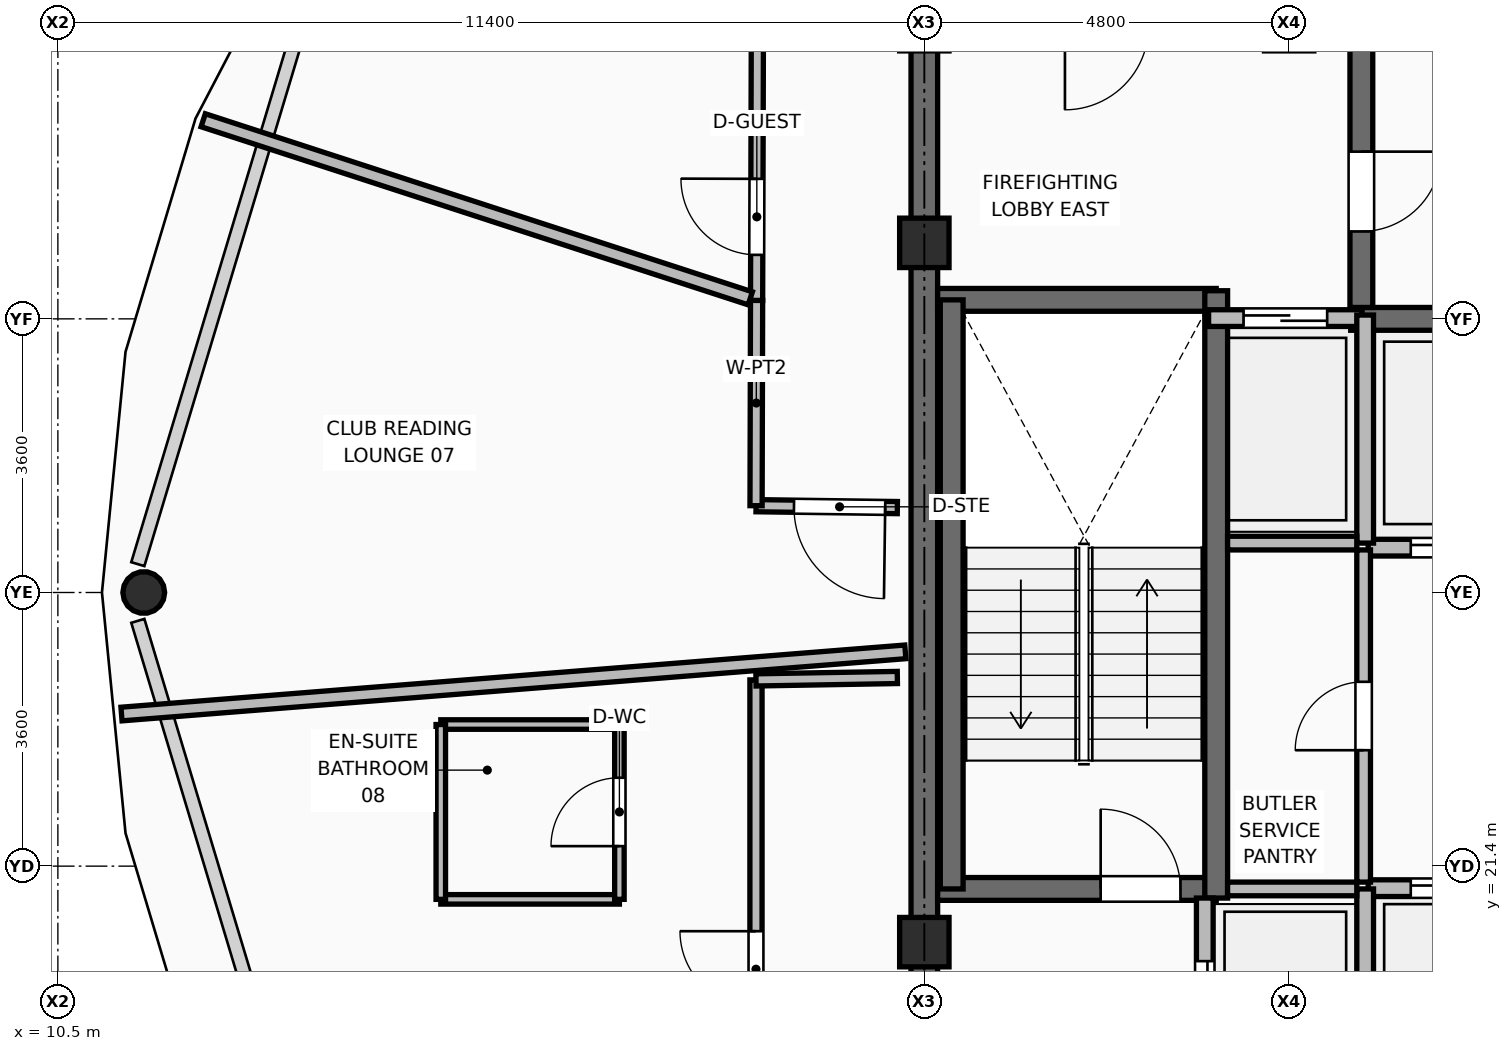
"""IFC4 building model, lengths in metres.
Left out: names, types, materials, properties, quantities, classifications, styles, units other than length and angle.
Written with IfcOpenShell. Run it as: python <this file> out.ifc"""

import sys

from ifc_helpers import new_model, si_unit, direction, frame, frame_2d, origin, origin_2d, place, context, subcontext, project, spatial, rectangle, hollow_circle, extrude, element, fill, save


model = new_model("IFC4")
c1 = context("Model", 3, precision=1e-05, world=origin(), true_north=direction((0.0, 1.0)))
c2 = subcontext(c1, "Body", "Model", "MODEL_VIEW")
j1 = project(units=[si_unit("LENGTHUNIT", "METRE"), si_unit("PLANEANGLEUNIT", "RADIAN")], contexts=[c1])
p1 = place(None, origin())
s1 = spatial("IfcSite", under=j1, at=p1, CompositionType="ELEMENT")
p2 = place(p1, origin())
s2 = spatial("IfcBuilding", under=s1, at=p2, CompositionType="ELEMENT")
p3 = place(p2, frame((0.0, 0.0, 263.85)))
s3 = spatial("IfcBuildingStorey", under=s2, at=p3, CompositionType="ELEMENT", Elevation=263.85)
for number, where, z_axis, x_axis in (
    (1, (21.9, 20.4, 0.0), (0.0, 0.0, 1.0), (1.0, 0.0, 0.0)),
    (2, (21.9, 29.6, 0.0), (0.0, 0.0, 1.0), (1.0, 0.0, 0.0)),
):
    element("IfcColumn", number, at=place(p3, frame(where, z_axis=z_axis, x_axis=x_axis)), inside=s3, PredefinedType="COLUMN", context=c2, shape_type="SweptSolid", body=[
        extrude(rectangle(XDim=0.65, YDim=0.65, at=origin_2d()), origin(), (0.0, 0.0, 1.0), 3.75),
    ])
p4 = place(p3, frame((11.63, 25.0, 0.0), z_axis=(0.022426310188, 0.0, 0.999748498679), x_axis=(0.0, 1.0, 0.0)))
e3 = element("IfcColumn", 3, at=p4, inside=s3, PredefinedType="COLUMN", context=c2, shape_type="SweptSolid", body=[
    extrude(hollow_circle(Radius=0.275, WallThickness=0.025, at=origin_2d()), origin(), (0.0, 0.0, 1.0), 3.571),
])
p5 = place(p3, frame((21.9, 17.975, 0.0), z_axis=(0.0, 0.0, 1.0), x_axis=(0.0, 1.0, 0.0)))
e4 = element("IfcWall", 4, at=p5, inside=s3, PredefinedType="SHEAR", context=c2, shape_type="SweptSolid", body=[
    extrude(rectangle(XDim=14.3, YDim=0.35, at=frame_2d((7.15, 0.0))), origin(), (0.0, 0.0, 1.0), 3.57),
])
p6 = place(p3, frame((22.075, 21.1, 0.0), z_axis=(0.0, 0.0, 1.0), x_axis=(1.0, 0.0, 0.0)))
e5 = element("IfcWall", 5, at=p6, inside=s3, PredefinedType="SHEAR", context=c2, shape_type="SweptSolid", body=[
    extrude(rectangle(XDim=3.665, YDim=0.3, at=frame_2d((1.833, 0.0))), origin(), (0.0, 0.0, 1.0), 3.57),
])
p7 = place(p6, frame((2.145, 0.0, 0.0)))
e6 = element("IfcOpeningElement", 6, at=p7, cuts=e5, PredefinedType="OPENING", context=c2, shape_type="SweptSolid", body=[
    extrude(rectangle(XDim=1.05, YDim=2.1, at=frame_2d((0.525, 1.05))), frame((0.0, 0.16, 0.0), z_axis=(0.0, -1.0, 0.0), x_axis=(1.0, 0.0, 0.0)), (0.0, 0.0, 1.0), 0.32),
])
p8 = place(p3, frame((22.075, 28.85, 0.0), z_axis=(0.0, 0.0, 1.0), x_axis=(1.0, 0.0, 0.0)))
e7 = element("IfcWall", 7, at=p8, inside=s3, PredefinedType="SHEAR", context=c2, shape_type="SweptSolid", body=[
    extrude(rectangle(XDim=3.665, YDim=0.3, at=frame_2d((1.833, 0.0))), origin(), (0.0, 0.0, 1.0), 3.57),
])
p9 = place(p3, frame((25.74, 20.98, 0.0), z_axis=(0.0, 0.0, 1.0), x_axis=(0.0, 1.0, 0.0)))
e8 = element("IfcWall", 8, at=p9, inside=s3, PredefinedType="SHEAR", context=c2, shape_type="SweptSolid", body=[
    extrude(rectangle(XDim=7.99, YDim=0.3, at=frame_2d((3.995, 0.0))), origin(), (0.0, 0.0, 1.0), 3.57),
])
p10 = place(p3, frame((22.26, 21.1, 0.0), z_axis=(0.0, 0.0, 1.0), x_axis=(0.0, 1.0, 0.0)))
e9 = element("IfcWall", 9, at=p10, inside=s3, PredefinedType="SHEAR", context=c2, shape_type="SweptSolid", body=[
    extrude(rectangle(XDim=7.75, YDim=0.3, at=frame_2d((3.875, 0.0))), origin(), (0.0, 0.0, 1.0), 3.57),
])
p11 = place(p3, frame((27.51, 28.6, 0.0), z_axis=(0.0, 0.0, 1.0), x_axis=(1.0, 0.0, 0.0)))
e10 = element("IfcWall", 10, at=p11, inside=s3, PredefinedType="SHEAR", context=c2, shape_type="SweptSolid", body=[
    extrude(rectangle(XDim=8.03, YDim=0.3, at=frame_2d((4.015, 0.0))), origin(), (0.0, 0.0, 1.0), 3.57),
])
p12 = place(p3, frame((27.65, 28.75, 0.0), z_axis=(0.0, 0.0, 1.0), x_axis=(0.0, 1.0, 0.0)))
e11 = element("IfcWall", 11, at=p12, inside=s3, PredefinedType="SHEAR", context=c2, shape_type="SweptSolid", body=[
    extrude(rectangle(XDim=3.525, YDim=0.3, at=frame_2d((1.762, 0.0))), origin(), (0.0, 0.0, 1.0), 3.57),
])
p13 = place(p12, frame((1.0, 0.0, 0.0)))
e12 = element("IfcOpeningElement", 12, at=p13, cuts=e11, PredefinedType="OPENING", context=c2, shape_type="SweptSolid", body=[
    extrude(rectangle(XDim=1.05, YDim=2.1, at=frame_2d((0.525, 1.05))), frame((0.0, 0.16, 0.0), z_axis=(0.0, -1.0, 0.0), x_axis=(1.0, 0.0, 0.0)), (0.0, 0.0, 1.0), 0.32),
])
p14 = place(p3, frame((25.59, 18.22, 0.0), z_axis=(0.0, 0.0, 1.0), x_axis=(0.0, 1.0, 0.0)))
e13 = element("IfcWall", 13, at=p14, inside=s3, PredefinedType="PARTITIONING", context=c2, shape_type="SweptSolid", body=[
    extrude(rectangle(XDim=2.76, YDim=0.22, at=frame_2d((1.38, 0.0))), origin(), (0.0, 0.0, 1.0), 3.55),
])
p15 = place(p14, frame((0.83, 0.0, 0.0)))
e14 = element("IfcOpeningElement", 14, at=p15, cuts=e13, PredefinedType="OPENING", context=c2, shape_type="SweptSolid", body=[
    extrude(rectangle(XDim=1.1, YDim=2.2, at=frame_2d((0.55, 1.1))), frame((0.0, 0.12, 0.0), z_axis=(0.0, -1.0, 0.0), x_axis=(1.0, 0.0, 0.0)), (0.0, 0.0, 1.0), 0.24),
])
p16 = place(p3, frame((25.64, 28.61, 0.0), z_axis=(0.0, 0.0, 1.0), x_axis=(1.0, 0.0, 0.0)))
e15 = element("IfcWall", 15, at=p16, inside=s3, PredefinedType="PARTITIONING", context=c2, shape_type="SweptSolid", body=[
    extrude(rectangle(XDim=2.02, YDim=0.22, at=frame_2d((1.01, 0.0))), origin(), (0.0, 0.0, 1.0), 3.55),
])
p17 = place(p16, frame((0.46, 0.0, 0.0)))
e16 = element("IfcOpeningElement", 16, at=p17, cuts=e15, PredefinedType="OPENING", context=c2, shape_type="SweptSolid", body=[
    extrude(rectangle(XDim=1.1, YDim=2.2, at=frame_2d((0.55, 1.1))), frame((0.0, 0.12, 0.0), z_axis=(0.0, -1.0, 0.0), x_axis=(1.0, 0.0, 0.0)), (0.0, 0.0, 1.0), 0.24),
])
p18 = place(p3, frame((27.74, 21.11, 0.0), z_axis=(0.0, 0.0, 1.0), x_axis=(1.0, 0.0, 0.0)))
e17 = element("IfcWall", 17, at=p18, inside=s3, PredefinedType="PARTITIONING", context=c2, shape_type="SweptSolid", body=[
    extrude(rectangle(XDim=2.22, YDim=0.22, at=frame_2d((1.11, 0.0))), origin(), (0.0, 0.0, 1.0), 3.55),
])
p19 = place(p18, frame((0.56, 0.0, 0.0)))
e18 = element("IfcOpeningElement", 18, at=p19, cuts=e17, PredefinedType="OPENING", context=c2, shape_type="SweptSolid", body=[
    extrude(rectangle(XDim=1.1, YDim=2.2, at=frame_2d((0.55, 1.1))), frame((0.0, 0.12, 0.0), z_axis=(0.0, -1.0, 0.0), x_axis=(1.0, 0.0, 0.0)), (0.0, 0.0, 1.0), 0.24),
])
p20 = place(p3, frame((27.74, 25.59, 0.0), z_axis=(0.0, 0.0, 1.0), x_axis=(1.0, 0.0, 0.0)))
e19 = element("IfcWall", 19, at=p20, inside=s3, PredefinedType="PARTITIONING", context=c2, shape_type="SweptSolid", body=[
    extrude(rectangle(XDim=2.22, YDim=0.22, at=frame_2d((1.11, 0.0))), origin(), (0.0, 0.0, 1.0), 3.55),
])
p21 = place(p20, frame((0.56, 0.0, 0.0)))
e20 = element("IfcOpeningElement", 20, at=p21, cuts=e19, PredefinedType="OPENING", context=c2, shape_type="SweptSolid", body=[
    extrude(rectangle(XDim=1.1, YDim=2.2, at=frame_2d((0.55, 1.1))), frame((0.0, 0.12, 0.0), z_axis=(0.0, -1.0, 0.0), x_axis=(1.0, 0.0, 0.0)), (0.0, 0.0, 1.0), 0.24),
])
p22 = place(p3, frame((27.7, 18.15, 0.0), z_axis=(0.0, 0.0, 1.0), x_axis=(0.0, 1.0, 0.0)))
e21 = element("IfcWall", 21, at=p22, inside=s3, PredefinedType="PARTITIONING", context=c2, shape_type="SweptSolid", body=[
    extrude(rectangle(XDim=2.95, YDim=0.22, at=frame_2d((1.475, 0.0))), origin(), (0.0, 0.0, 1.0), 3.55),
])
p23 = place(p3, frame((27.7, 25.65, 0.0), z_axis=(0.0, 0.0, 1.0), x_axis=(0.0, 1.0, 0.0)))
e22 = element("IfcWall", 22, at=p23, inside=s3, PredefinedType="PARTITIONING", context=c2, shape_type="SweptSolid", body=[
    extrude(rectangle(XDim=3.0, YDim=0.22, at=frame_2d((1.5, 0.0))), origin(), (0.0, 0.0, 1.0), 3.55),
])
for number, where, z_axis, x_axis in (
    (23, (25.89, 21.1, 0.0), (0.0, 0.0, 1.0), (1.0, 0.0, 0.0)),
    (24, (25.89, 25.65, 0.0), (0.0, 0.0, 1.0), (1.0, 0.0, 0.0)),
):
    element("IfcWall", number, at=place(p3, frame(where, z_axis=z_axis, x_axis=x_axis)), inside=s3, PredefinedType="PARTITIONING", context=c2, shape_type="SweptSolid", body=[
        extrude(rectangle(XDim=1.7, YDim=0.18, at=frame_2d((0.85, 0.0))), origin(), (0.0, 0.0, 1.0), 3.55),
    ])
p24 = place(p3, frame((27.68, 21.19, 0.0), z_axis=(0.0, 0.0, 1.0), x_axis=(0.0, 1.0, 0.0)))
e25 = element("IfcWall", 25, at=p24, inside=s3, PredefinedType="PARTITIONING", context=c2, shape_type="SweptSolid", body=[
    extrude(rectangle(XDim=4.37, YDim=0.18, at=frame_2d((2.185, 0.0))), origin(), (0.0, 0.0, 1.0), 3.55),
])
p25 = place(p24, frame((1.735, 0.0, 0.0)))
e26 = element("IfcOpeningElement", 26, at=p25, cuts=e25, PredefinedType="OPENING", context=c2, shape_type="SweptSolid", body=[
    extrude(rectangle(XDim=0.9, YDim=2.1, at=frame_2d((0.45, 1.05))), frame((0.0, 0.1, 0.0), z_axis=(0.0, -1.0, 0.0), x_axis=(1.0, 0.0, 0.0)), (0.0, 0.0, 1.0), 0.2),
])
p26 = place(p3, frame((21.545, 26.117, 0.0), z_axis=(0.0, 0.0, 1.0), x_axis=(-0.999908513059, 0.0135264745, 0.0)))
e27 = element("IfcWall", 27, at=p26, inside=s3, PredefinedType="PARTITIONING", context=c2, shape_type="SweptSolid", body=[
    extrude(rectangle(XDim=1.859, YDim=0.16, at=frame_2d((0.93, 0.0))), origin(), (0.0, 0.0, 1.0), 2.595),
])
p27 = place(p26, frame((0.16, 0.0, 0.0)))
e28 = element("IfcOpeningElement", 28, at=p27, cuts=e27, PredefinedType="OPENING", context=c2, shape_type="SweptSolid", body=[
    extrude(rectangle(XDim=1.2, YDim=2.1, at=frame_2d((0.6, 1.05))), frame((0.0, 0.09, 0.0), z_axis=(0.0, -1.0, 0.0), x_axis=(1.0, 0.0, 0.0)), (0.0, 0.0, 1.0), 0.18),
])
p28 = place(p3, frame((19.686, 26.142, 0.0), z_axis=(0.0, 0.0, 1.0), x_axis=(0.002621341441, 0.999996564279, 0.0)))
e29 = element("IfcWall", 29, at=p28, inside=s3, PredefinedType="PARTITIONING", context=c2, shape_type="SweptSolid", body=[
    extrude(rectangle(XDim=2.701, YDim=0.16, at=frame_2d((1.351, 0.0))), origin(), (0.0, 0.0, 1.0), 3.55),
])
p29 = place(p3, frame((19.693, 28.843, 0.0), z_axis=(0.0, 0.0, 1.0), x_axis=(0.002904196475, 0.999995782813, 0.0)))
e30 = element("IfcWall", 30, at=p29, inside=s3, PredefinedType="PARTITIONING", context=c2, shape_type="SweptSolid", body=[
    extrude(rectangle(XDim=5.128, YDim=0.16, at=frame_2d((2.564, 0.0))), origin(), (0.0, 0.0, 1.0), 3.092),
])
p30 = place(p29, frame((0.599, 0.0, 0.0)))
e31 = element("IfcOpeningElement", 31, at=p30, cuts=e30, PredefinedType="OPENING", context=c2, shape_type="SweptSolid", body=[
    extrude(rectangle(XDim=1.0, YDim=2.1, at=frame_2d((0.5, 1.05))), frame((0.0, 0.09, 0.0), z_axis=(0.0, -1.0, 0.0), x_axis=(1.0, 0.0, 0.0)), (0.0, 0.0, 1.0), 0.18),
])
p31 = place(p3, frame((19.685, 13.242, 0.0), z_axis=(0.0, 0.0, 1.0), x_axis=(0.0, 1.0, 0.0)))
e32 = element("IfcWall", 32, at=p31, inside=s3, PredefinedType="PARTITIONING", context=c2, shape_type="SweptSolid", body=[
    extrude(rectangle(XDim=10.608, YDim=0.16, at=frame_2d((5.304, 0.0))), origin(), (0.0, 0.0, 1.0), 3.132),
])
p32 = place(p31, frame((6.302, 0.0, 0.0)))
e33 = element("IfcOpeningElement", 33, at=p32, cuts=e32, PredefinedType="OPENING", context=c2, shape_type="SweptSolid", body=[
    extrude(rectangle(XDim=1.0, YDim=2.1, at=frame_2d((0.5, 1.05))), frame((0.0, 0.09, 0.0), z_axis=(0.0, -1.0, 0.0), x_axis=(1.0, 0.0, 0.0)), (0.0, 0.0, 1.0), 0.18),
])
p33 = place(p3, frame((19.685, 23.85, 0.0), z_axis=(0.0, 0.0, 1.0), x_axis=(0.999852179606, 0.017193572529, 0.0)))
e34 = element("IfcWall", 34, at=p33, inside=s3, PredefinedType="PARTITIONING", context=c2, shape_type="SweptSolid", body=[
    extrude(rectangle(XDim=1.86, YDim=0.16, at=frame_2d((0.93, 0.0))), origin(), (0.0, 0.0, 1.0), 2.595),
])
p34 = place(p3, frame((19.61, 28.87, 0.0), z_axis=(0.0, 0.0, 1.0), x_axis=(-0.950901014296, 0.309495171224, 0.0)))
e35 = element("IfcWall", 35, at=p34, inside=s3, PredefinedType="PARTITIONING", context=c2, shape_type="SweptSolid", body=[
    extrude(rectangle(XDim=7.57, YDim=0.18, at=frame_2d((3.785, 0.0))), origin(), (0.0, 0.0, 1.0), 2.963),
])
p35 = place(p3, frame((21.65, 24.219, 0.0), z_axis=(0.0, 0.0, 1.0), x_axis=(-0.996868257598, -0.079080193438, 0.0)))
e36 = element("IfcWall", 36, at=p35, inside=s3, PredefinedType="PARTITIONING", context=c2, shape_type="SweptSolid", body=[
    extrude(rectangle(XDim=10.345, YDim=0.18, at=frame_2d((5.173, 0.0))), origin(), (0.0, 0.0, 1.0), 2.595),
])
p36 = place(p3, frame((15.538, 20.963, 0.0), z_axis=(0.0, 0.0, 1.0), x_axis=(1.0, 0.0, 0.0)))
e37 = element("IfcWall", 37, at=p36, inside=s3, PredefinedType="PARTITIONING", context=c2, shape_type="SweptSolid", body=[
    extrude(rectangle(XDim=2.35, YDim=0.125, at=frame_2d((1.175, 0.0))), origin(), (0.0, 0.0, 1.0), 3.55),
])
p37 = place(p3, frame((15.538, 23.263, 0.0), z_axis=(0.0, 0.0, 1.0), x_axis=(1.0, 0.0, 0.0)))
e38 = element("IfcWall", 38, at=p37, inside=s3, PredefinedType="PARTITIONING", context=c2, shape_type="SweptSolid", body=[
    extrude(rectangle(XDim=2.35, YDim=0.125, at=frame_2d((1.175, 0.0))), origin(), (0.0, 0.0, 1.0), 3.132),
])
p38 = place(p3, frame((15.538, 20.963, 0.0), z_axis=(0.0, 0.0, 1.0), x_axis=(0.0, 1.0, 0.0)))
e39 = element("IfcWall", 39, at=p38, inside=s3, PredefinedType="PARTITIONING", context=c2, shape_type="SweptSolid", body=[
    extrude(rectangle(XDim=2.3, YDim=0.125, at=frame_2d((1.15, 0.0))), origin(), (0.0, 0.0, 1.0), 3.132),
])
p39 = place(p3, frame((17.888, 20.963, 0.0), z_axis=(0.0, 0.0, 1.0), x_axis=(0.0, 1.0, 0.0)))
e40 = element("IfcWall", 40, at=p39, inside=s3, PredefinedType="PARTITIONING", context=c2, shape_type="SweptSolid", body=[
    extrude(rectangle(XDim=2.3, YDim=0.125, at=frame_2d((1.15, 0.0))), origin(), (0.0, 0.0, 1.0), 3.132),
])
p40 = place(p39, frame((0.7, 0.0, 0.0)))
e41 = element("IfcOpeningElement", 41, at=p40, cuts=e40, PredefinedType="OPENING", context=c2, shape_type="SweptSolid", body=[
    extrude(rectangle(XDim=0.9, YDim=2.1, at=frame_2d((0.45, 1.05))), frame((0.0, 0.073, 0.0), z_axis=(0.0, -1.0, 0.0), x_axis=(1.0, 0.0, 0.0)), (0.0, 0.0, 1.0), 0.145),
])
p41 = place(p7, origin())
e42 = element("IfcDoor", 42, at=p41, inside=s3, OperationType="SINGLE_SWING_LEFT", PredefinedType="DOOR", context=c2, shape_type="SweptSolid", body=[
    extrude(rectangle(XDim=1.05, YDim=2.1, at=frame_2d((0.525, 1.05))), frame((0.0, 0.025, 0.0), z_axis=(0.0, -1.0, 0.0), x_axis=(1.0, 0.0, 0.0)), (0.0, 0.0, 1.0), 0.05),
])
fill(e6, e42)
p42 = place(p13, frame((1.05, 0.0, 0.0), z_axis=(0.0, 0.0, 1.0), x_axis=(-1.0, 0.0, 0.0)))
e43 = element("IfcDoor", 43, at=p42, inside=s3, OperationType="SINGLE_SWING_LEFT", PredefinedType="DOOR", context=c2, shape_type="SweptSolid", body=[
    extrude(rectangle(XDim=1.05, YDim=2.1, at=frame_2d((0.525, 1.05))), frame((0.0, 0.025, 0.0), z_axis=(0.0, -1.0, 0.0), x_axis=(1.0, 0.0, 0.0)), (0.0, 0.0, 1.0), 0.05),
])
fill(e12, e43)
p43 = place(p15, origin())
e44 = element("IfcDoor", 44, at=p43, inside=s3, OperationType="DOUBLE_DOOR_SLIDING", PredefinedType="DOOR", context=c2, shape_type="SweptSolid", body=[
    extrude(rectangle(XDim=1.1, YDim=2.2, at=frame_2d((0.55, 1.1))), frame((0.0, 0.025, 0.0), z_axis=(0.0, -1.0, 0.0), x_axis=(1.0, 0.0, 0.0)), (0.0, 0.0, 1.0), 0.05),
])
fill(e14, e44)
p44 = place(p17, origin())
e45 = element("IfcDoor", 45, at=p44, inside=s3, OperationType="DOUBLE_DOOR_SLIDING", PredefinedType="DOOR", context=c2, shape_type="SweptSolid", body=[
    extrude(rectangle(XDim=1.1, YDim=2.2, at=frame_2d((0.55, 1.1))), frame((0.0, 0.025, 0.0), z_axis=(0.0, -1.0, 0.0), x_axis=(1.0, 0.0, 0.0)), (0.0, 0.0, 1.0), 0.05),
])
fill(e16, e45)
p45 = place(p19, origin())
e46 = element("IfcDoor", 46, at=p45, inside=s3, OperationType="DOUBLE_DOOR_SLIDING", PredefinedType="DOOR", context=c2, shape_type="SweptSolid", body=[
    extrude(rectangle(XDim=1.1, YDim=2.2, at=frame_2d((0.55, 1.1))), frame((0.0, 0.025, 0.0), z_axis=(0.0, -1.0, 0.0), x_axis=(1.0, 0.0, 0.0)), (0.0, 0.0, 1.0), 0.05),
])
fill(e18, e46)
p46 = place(p21, frame((1.1, 0.0, 0.0), z_axis=(0.0, 0.0, 1.0), x_axis=(-1.0, 0.0, 0.0)))
e47 = element("IfcDoor", 47, at=p46, inside=s3, OperationType="DOUBLE_DOOR_SLIDING", PredefinedType="DOOR", context=c2, shape_type="SweptSolid", body=[
    extrude(rectangle(XDim=1.1, YDim=2.2, at=frame_2d((0.55, 1.1))), frame((0.0, 0.025, 0.0), z_axis=(0.0, -1.0, 0.0), x_axis=(1.0, 0.0, 0.0)), (0.0, 0.0, 1.0), 0.05),
])
fill(e20, e47)
p47 = place(p25, origin())
e48 = element("IfcDoor", 48, at=p47, inside=s3, OperationType="SINGLE_SWING_LEFT", PredefinedType="DOOR", context=c2, shape_type="SweptSolid", body=[
    extrude(rectangle(XDim=0.9, YDim=2.1, at=frame_2d((0.45, 1.05))), frame((0.0, 0.025, 0.0), z_axis=(0.0, -1.0, 0.0), x_axis=(1.0, 0.0, 0.0)), (0.0, 0.0, 1.0), 0.05),
])
fill(e26, e48)
p48 = place(p30, origin())
e49 = element("IfcDoor", 49, at=p48, inside=s3, OperationType="SINGLE_SWING_RIGHT", PredefinedType="DOOR", context=c2, shape_type="SweptSolid", body=[
    extrude(rectangle(XDim=1.0, YDim=2.1, at=frame_2d((0.5, 1.05))), frame((0.0, 0.025, 0.0), z_axis=(0.0, -1.0, 0.0), x_axis=(1.0, 0.0, 0.0)), (0.0, 0.0, 1.0), 0.05),
])
fill(e31, e49)
p49 = place(p27, origin())
e50 = element("IfcDoor", 50, at=p49, inside=s3, OperationType="SINGLE_SWING_LEFT", PredefinedType="DOOR", context=c2, shape_type="SweptSolid", body=[
    extrude(rectangle(XDim=1.2, YDim=2.1, at=frame_2d((0.6, 1.05))), frame((0.0, 0.025, 0.0), z_axis=(0.0, -1.0, 0.0), x_axis=(1.0, 0.0, 0.0)), (0.0, 0.0, 1.0), 0.05),
])
fill(e28, e50)
p50 = place(p40, origin())
e51 = element("IfcDoor", 51, at=p50, inside=s3, OperationType="SINGLE_SWING_LEFT", PredefinedType="DOOR", context=c2, shape_type="SweptSolid", body=[
    extrude(rectangle(XDim=0.9, YDim=2.1, at=frame_2d((0.45, 1.05))), frame((0.0, 0.025, 0.0), z_axis=(0.0, -1.0, 0.0), x_axis=(1.0, 0.0, 0.0)), (0.0, 0.0, 1.0), 0.05),
])
fill(e41, e51)
p51 = place(p32, origin())
e52 = element("IfcDoor", 52, at=p51, inside=s3, OperationType="SINGLE_SWING_RIGHT", PredefinedType="DOOR", context=c2, shape_type="SweptSolid", body=[
    extrude(rectangle(XDim=1.0, YDim=2.1, at=frame_2d((0.5, 1.05))), frame((0.0, 0.025, 0.0), z_axis=(0.0, -1.0, 0.0), x_axis=(1.0, 0.0, 0.0)), (0.0, 0.0, 1.0), 0.05),
])
fill(e33, e52)
save(model, sys.argv[1])
